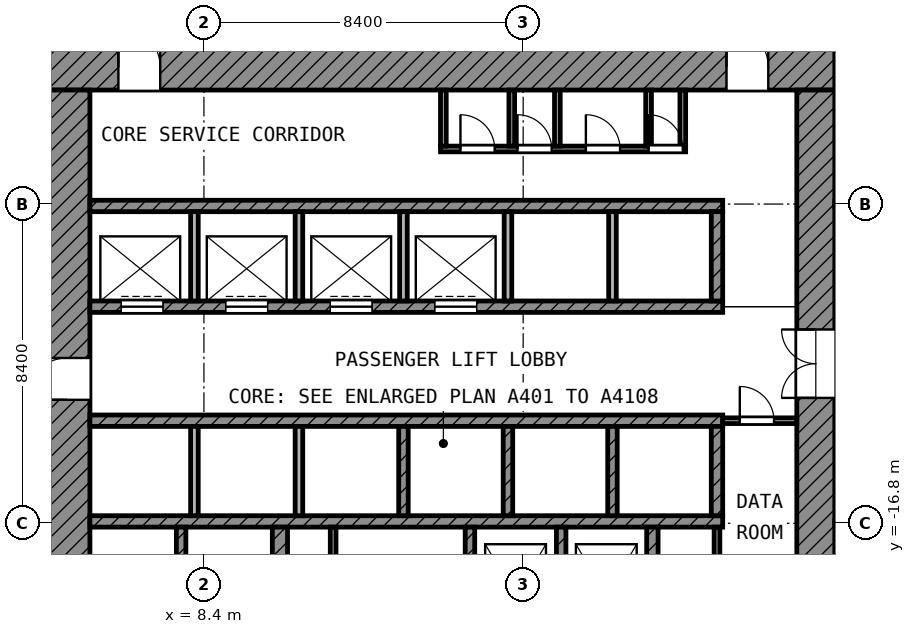
"""IFC4 building model, lengths in metres.
Left out: names, types, materials, properties, quantities, classifications, styles, units other than length and angle.
Written with IfcOpenShell. Run it as: python <this file> out.ifc"""

import sys

from ifc_helpers import new_model, si_unit, direction, frame, frame_2d, origin, place, context, subcontext, project, spatial, rectangle, extrude, element, fill, save


model = new_model("IFC4")
c1 = context("Model", 3, precision=1e-05, world=origin(), true_north=direction((0.0, 1.0)))
c2 = subcontext(c1, "Body", "Model", "MODEL_VIEW")
j1 = project(units=[si_unit("LENGTHUNIT", "METRE"), si_unit("PLANEANGLEUNIT", "RADIAN")], contexts=[c1])
p1 = place(None, origin())
s1 = spatial("IfcSite", under=j1, at=p1, CompositionType="ELEMENT")
p2 = place(p1, origin())
s2 = spatial("IfcBuilding", under=s1, at=p2, CompositionType="ELEMENT")
p3 = place(p2, frame((0.0, 0.0, 149.2)))
s3 = spatial("IfcBuildingStorey", under=s2, at=p3, CompositionType="ELEMENT", Elevation=149.2)
p4 = place(p3, frame((4.2, -4.8, 0.0), z_axis=(0.0, 0.0, 1.0), x_axis=(1.0, 0.0, 0.0)))
e1 = element("IfcWall", 1, at=p4, inside=s3, PredefinedType="SHEAR", context=c2, shape_type="SweptSolid", body=[
    extrude(rectangle(XDim=20.8, YDim=1.2, at=frame_2d((10.4, 0.0))), origin(), (0.0, 0.0, 1.0), 3.7),
])
p5 = place(p4, frame((1.95, 0.0, 0.0)))
e2 = element("IfcOpeningElement", 2, at=p5, cuts=e1, PredefinedType="OPENING", context=c2, shape_type="SweptSolid", body=[
    extrude(rectangle(XDim=1.1, YDim=2.1, at=frame_2d((0.55, 1.05))), frame((0.0, 0.61, 0.0), z_axis=(0.0, -1.0, 0.0), x_axis=(1.0, 0.0, 0.0)), (0.0, 0.0, 1.0), 1.22),
])
p6 = place(p4, frame((17.95, 0.0, 0.0)))
e3 = element("IfcOpeningElement", 3, at=p6, cuts=e1, PredefinedType="OPENING", context=c2, shape_type="SweptSolid", body=[
    extrude(rectangle(XDim=1.1, YDim=2.1, at=frame_2d((0.55, 1.05))), frame((0.0, 0.61, 0.0), z_axis=(0.0, -1.0, 0.0), x_axis=(1.0, 0.0, 0.0)), (0.0, 0.0, 1.0), 1.22),
])
p7 = place(p3, frame((4.8, -25.0, 0.0), z_axis=(0.0, 0.0, 1.0), x_axis=(0.0, 1.0, 0.0)))
e4 = element("IfcWall", 4, at=p7, inside=s3, PredefinedType="SHEAR", context=c2, shape_type="SweptSolid", body=[
    extrude(rectangle(XDim=19.6, YDim=1.2, at=frame_2d((9.8, 0.0))), origin(), (0.0, 0.0, 1.0), 3.7),
])
p8 = place(p7, frame((11.45, 0.0, 0.0)))
e5 = element("IfcOpeningElement", 5, at=p8, cuts=e4, PredefinedType="OPENING", context=c2, shape_type="SweptSolid", body=[
    extrude(rectangle(XDim=1.1, YDim=2.1, at=frame_2d((0.55, 1.05))), frame((0.0, 0.61, 0.0), z_axis=(0.0, -1.0, 0.0), x_axis=(1.0, 0.0, 0.0)), (0.0, 0.0, 1.0), 1.22),
])
p9 = place(p7, frame((2.15, 0.0, 0.0)))
e6 = element("IfcOpeningElement", 6, at=p9, cuts=e4, PredefinedType="OPENING", context=c2, shape_type="SweptSolid", body=[
    extrude(rectangle(XDim=1.1, YDim=2.1, at=frame_2d((0.55, 1.05))), frame((0.0, 0.61, 0.0), z_axis=(0.0, -1.0, 0.0), x_axis=(1.0, 0.0, 0.0)), (0.0, 0.0, 1.0), 1.22),
])
p10 = place(p3, frame((24.5, -24.0, 0.0), z_axis=(0.0, 0.0, 1.0), x_axis=(0.0, 1.0, 0.0)))
e7 = element("IfcWall", 7, at=p10, inside=s3, PredefinedType="SHEAR", context=c2, shape_type="SweptSolid", body=[
    extrude(rectangle(XDim=18.6, YDim=1.0, at=frame_2d((9.3, 0.0))), origin(), (0.0, 0.0, 1.0), 3.7),
])
p11 = place(p10, frame((10.5, 0.0, 0.0)))
e8 = element("IfcOpeningElement", 8, at=p11, cuts=e7, PredefinedType="OPENING", context=c2, shape_type="SweptSolid", body=[
    extrude(rectangle(XDim=1.8, YDim=2.1, at=frame_2d((0.9, 1.05))), frame((0.0, 0.51, 0.0), z_axis=(0.0, -1.0, 0.0), x_axis=(1.0, 0.0, 0.0)), (0.0, 0.0, 1.0), 1.02),
])
p12 = place(p3, frame((5.4, -8.45, 0.0), z_axis=(0.0, 0.0, 1.0), x_axis=(1.0, 0.0, 0.0)))
e9 = element("IfcWall", 9, at=p12, inside=s3, PredefinedType="SHEAR", context=c2, shape_type="SweptSolid", body=[
    extrude(rectangle(XDim=16.65, YDim=0.3, at=frame_2d((8.325, 0.0))), origin(), (0.0, 0.0, 1.0), 3.7),
])
p13 = place(p3, frame((5.4, -11.1, 0.0), z_axis=(0.0, 0.0, 1.0), x_axis=(1.0, 0.0, 0.0)))
e10 = element("IfcWall", 10, at=p13, inside=s3, PredefinedType="SHEAR", context=c2, shape_type="SweptSolid", body=[
    extrude(rectangle(XDim=16.65, YDim=0.3, at=frame_2d((8.325, 0.0))), origin(), (0.0, 0.0, 1.0), 3.7),
])
p14 = place(p13, frame((0.825, 0.0, 0.0)))
e11 = element("IfcOpeningElement", 11, at=p14, cuts=e10, PredefinedType="OPENING", context=c2, shape_type="SweptSolid", body=[
    extrude(rectangle(XDim=1.1, YDim=2.1, at=frame_2d((0.55, 1.05))), frame((0.0, 0.16, 0.0), z_axis=(0.0, -1.0, 0.0), x_axis=(1.0, 0.0, 0.0)), (0.0, 0.0, 1.0), 0.32),
])
p15 = place(p13, frame((3.575, 0.0, 0.0)))
e12 = element("IfcOpeningElement", 12, at=p15, cuts=e10, PredefinedType="OPENING", context=c2, shape_type="SweptSolid", body=[
    extrude(rectangle(XDim=1.1, YDim=2.1, at=frame_2d((0.55, 1.05))), frame((0.0, 0.16, 0.0), z_axis=(0.0, -1.0, 0.0), x_axis=(1.0, 0.0, 0.0)), (0.0, 0.0, 1.0), 0.32),
])
p16 = place(p13, frame((6.325, 0.0, 0.0)))
e13 = element("IfcOpeningElement", 13, at=p16, cuts=e10, PredefinedType="OPENING", context=c2, shape_type="SweptSolid", body=[
    extrude(rectangle(XDim=1.1, YDim=2.1, at=frame_2d((0.55, 1.05))), frame((0.0, 0.16, 0.0), z_axis=(0.0, -1.0, 0.0), x_axis=(1.0, 0.0, 0.0)), (0.0, 0.0, 1.0), 0.32),
])
p17 = place(p13, frame((9.075, 0.0, 0.0)))
e14 = element("IfcOpeningElement", 14, at=p17, cuts=e10, PredefinedType="OPENING", context=c2, shape_type="SweptSolid", body=[
    extrude(rectangle(XDim=1.1, YDim=2.1, at=frame_2d((0.55, 1.05))), frame((0.0, 0.16, 0.0), z_axis=(0.0, -1.0, 0.0), x_axis=(1.0, 0.0, 0.0)), (0.0, 0.0, 1.0), 0.32),
])
for number, where, z_axis, x_axis in (
    (15, (5.4, -14.1, 0.0), (0.0, 0.0, 1.0), (1.0, 0.0, 0.0)),
    (16, (5.4, -16.75, 0.0), (0.0, 0.0, 1.0), (1.0, 0.0, 0.0)),
):
    element("IfcWall", number, at=place(p3, frame(where, z_axis=z_axis, x_axis=x_axis)), inside=s3, PredefinedType="SHEAR", context=c2, shape_type="SweptSolid", body=[
        extrude(rectangle(XDim=16.65, YDim=0.3, at=frame_2d((8.325, 0.0))), origin(), (0.0, 0.0, 1.0), 3.7),
    ])
p18 = place(p3, frame((10.4, -20.05, 0.0), z_axis=(0.0, 0.0, 1.0), x_axis=(0.0, 1.0, 0.0)))
e17 = element("IfcWall", 17, at=p18, inside=s3, PredefinedType="SHEAR", context=c2, shape_type="SweptSolid", body=[
    extrude(rectangle(XDim=3.15, YDim=0.4, at=frame_2d((1.575, 0.0))), origin(), (0.0, 0.0, 1.0), 3.7),
])
p19 = place(p3, frame((20.2, -20.35, 0.0), z_axis=(0.0, 0.0, 1.0), x_axis=(0.0, 1.0, 0.0)))
e18 = element("IfcWall", 18, at=p19, inside=s3, PredefinedType="SHEAR", context=c2, shape_type="SweptSolid", body=[
    extrude(rectangle(XDim=3.45, YDim=0.3, at=frame_2d((1.725, 0.0))), origin(), (0.0, 0.0, 1.0), 3.7),
])
p20 = place(p3, frame((21.9, -10.95, 0.0), z_axis=(0.0, 0.0, 1.0), x_axis=(0.0, 1.0, 0.0)))
e19 = element("IfcWall", 19, at=p20, inside=s3, PredefinedType="SHEAR", context=c2, shape_type="SweptSolid", body=[
    extrude(rectangle(XDim=2.35, YDim=0.3, at=frame_2d((1.175, 0.0))), origin(), (0.0, 0.0, 1.0), 3.7),
])
p21 = place(p3, frame((21.9, -16.6, 0.0), z_axis=(0.0, 0.0, 1.0), x_axis=(0.0, 1.0, 0.0)))
e20 = element("IfcWall", 20, at=p21, inside=s3, PredefinedType="SHEAR", context=c2, shape_type="SweptSolid", body=[
    extrude(rectangle(XDim=2.35, YDim=0.3, at=frame_2d((1.175, 0.0))), origin(), (0.0, 0.0, 1.0), 3.7),
])
for number, where, z_axis, x_axis in (
    (21, (7.8, -20.05, 0.0), (0.0, 0.0, 1.0), (0.0, 1.0, 0.0)),
    (22, (15.4, -20.05, 0.0), (0.0, 0.0, 1.0), (0.0, 1.0, 0.0)),
    (23, (17.8, -20.05, 0.0), (0.0, 0.0, 1.0), (0.0, 1.0, 0.0)),
):
    element("IfcWall", number, at=place(p3, frame(where, z_axis=z_axis, x_axis=x_axis)), inside=s3, PredefinedType="SHEAR", context=c2, shape_type="SweptSolid", body=[
        extrude(rectangle(XDim=3.15, YDim=0.25, at=frame_2d((1.575, 0.0))), origin(), (0.0, 0.0, 1.0), 3.7),
    ])
for number, where, z_axis, x_axis in (
    (24, (8.15, -10.95, 0.0), (0.0, 0.0, 1.0), (0.0, 1.0, 0.0)),
    (25, (10.9, -10.95, 0.0), (0.0, 0.0, 1.0), (0.0, 1.0, 0.0)),
    (26, (13.65, -10.95, 0.0), (0.0, 0.0, 1.0), (0.0, 1.0, 0.0)),
    (27, (16.4, -10.95, 0.0), (0.0, 0.0, 1.0), (0.0, 1.0, 0.0)),
    (28, (19.15, -10.95, 0.0), (0.0, 0.0, 1.0), (0.0, 1.0, 0.0)),
):
    element("IfcWall", number, at=place(p3, frame(where, z_axis=z_axis, x_axis=x_axis)), inside=s3, PredefinedType="PARTITIONING", context=c2, shape_type="SweptSolid", body=[
        extrude(rectangle(XDim=2.35, YDim=0.2, at=frame_2d((1.175, 0.0))), origin(), (0.0, 0.0, 1.0), 3.7),
    ])
for number, where, z_axis, x_axis in (
    (29, (8.15, -16.6, 0.0), (0.0, 0.0, 1.0), (0.0, 1.0, 0.0)),
    (30, (10.9, -16.6, 0.0), (0.0, 0.0, 1.0), (0.0, 1.0, 0.0)),
):
    element("IfcWall", number, at=place(p3, frame(where, z_axis=z_axis, x_axis=x_axis)), inside=s3, PredefinedType="PARTITIONING", context=c2, shape_type="SweptSolid", body=[
        extrude(rectangle(XDim=2.35, YDim=0.2, at=frame_2d((1.175, 0.0))), origin(), (0.0, 0.0, 1.0), 3.7),
    ])
for number, where, z_axis, x_axis in (
    (31, (13.65, -16.6, 0.0), (0.0, 0.0, 1.0), (0.0, 1.0, 0.0)),
    (32, (16.4, -16.6, 0.0), (0.0, 0.0, 1.0), (0.0, 1.0, 0.0)),
    (33, (19.15, -16.6, 0.0), (0.0, 0.0, 1.0), (0.0, 1.0, 0.0)),
):
    element("IfcWall", number, at=place(p3, frame(where, z_axis=z_axis, x_axis=x_axis)), inside=s3, PredefinedType="SHEAR", context=c2, shape_type="SweptSolid", body=[
        extrude(rectangle(XDim=2.35, YDim=0.25, at=frame_2d((1.175, 0.0))), origin(), (0.0, 0.0, 1.0), 3.7),
    ])
p22 = place(p3, frame((21.9, -19.05, 0.0), z_axis=(0.0, 0.0, 1.0), x_axis=(0.0, 1.0, 0.0)))
e34 = element("IfcWall", 34, at=p22, inside=s3, PredefinedType="PARTITIONING", context=c2, shape_type="SweptSolid", body=[
    extrude(rectangle(XDim=2.15, YDim=0.15, at=frame_2d((1.075, 0.0))), origin(), (0.0, 0.0, 1.0), 3.7),
])
p23 = place(p3, frame((22.05, -14.1, 0.0), z_axis=(0.0, 0.0, 1.0), x_axis=(1.0, 0.0, 0.0)))
e35 = element("IfcWall", 35, at=p23, inside=s3, PredefinedType="PARTITIONING", context=c2, shape_type="SweptSolid", body=[
    extrude(rectangle(XDim=1.95, YDim=0.15, at=frame_2d((0.975, 0.0))), origin(), (0.0, 0.0, 1.0), 3.7),
])
p24 = place(p23, frame((0.45, 0.0, 0.0)))
e36 = element("IfcOpeningElement", 36, at=p24, cuts=e35, PredefinedType="OPENING", context=c2, shape_type="SweptSolid", body=[
    extrude(rectangle(XDim=0.9, YDim=2.1, at=frame_2d((0.45, 1.05))), frame((0.0, 0.085, 0.0), z_axis=(0.0, -1.0, 0.0), x_axis=(1.0, 0.0, 0.0)), (0.0, 0.0, 1.0), 0.17),
])
p25 = place(p3, frame((14.625, -6.95, 0.0), z_axis=(0.0, 0.0, 1.0), x_axis=(1.0, 0.0, 0.0)))
e37 = element("IfcWall", 37, at=p25, inside=s3, PredefinedType="PARTITIONING", context=c2, shape_type="SweptSolid", body=[
    extrude(rectangle(XDim=6.45, YDim=0.15, at=frame_2d((3.225, 0.0))), origin(), (0.0, 0.0, 1.0), 3.7),
])
p26 = place(p25, frame((0.525, 0.0, 0.0)))
e38 = element("IfcOpeningElement", 38, at=p26, cuts=e37, PredefinedType="OPENING", context=c2, shape_type="SweptSolid", body=[
    extrude(rectangle(XDim=0.9, YDim=2.1, at=frame_2d((0.45, 1.05))), frame((0.0, 0.085, 0.0), z_axis=(0.0, -1.0, 0.0), x_axis=(1.0, 0.0, 0.0)), (0.0, 0.0, 1.0), 0.17),
])
p27 = place(p25, frame((2.025, 0.0, 0.0)))
e39 = element("IfcOpeningElement", 39, at=p27, cuts=e37, PredefinedType="OPENING", context=c2, shape_type="SweptSolid", body=[
    extrude(rectangle(XDim=0.9, YDim=2.1, at=frame_2d((0.45, 1.05))), frame((0.0, 0.085, 0.0), z_axis=(0.0, -1.0, 0.0), x_axis=(1.0, 0.0, 0.0)), (0.0, 0.0, 1.0), 0.17),
])
p28 = place(p25, frame((3.825, 0.0, 0.0)))
e40 = element("IfcOpeningElement", 40, at=p28, cuts=e37, PredefinedType="OPENING", context=c2, shape_type="SweptSolid", body=[
    extrude(rectangle(XDim=0.9, YDim=2.1, at=frame_2d((0.45, 1.05))), frame((0.0, 0.085, 0.0), z_axis=(0.0, -1.0, 0.0), x_axis=(1.0, 0.0, 0.0)), (0.0, 0.0, 1.0), 0.17),
])
p29 = place(p25, frame((5.475, 0.0, 0.0)))
e41 = element("IfcOpeningElement", 41, at=p29, cuts=e37, PredefinedType="OPENING", context=c2, shape_type="SweptSolid", body=[
    extrude(rectangle(XDim=0.9, YDim=2.1, at=frame_2d((0.45, 1.05))), frame((0.0, 0.085, 0.0), z_axis=(0.0, -1.0, 0.0), x_axis=(1.0, 0.0, 0.0)), (0.0, 0.0, 1.0), 0.17),
])
p30 = place(p3, frame((11.8, -20.05, 0.0), z_axis=(0.0, 0.0, 1.0), x_axis=(0.0, 1.0, 0.0)))
e42 = element("IfcWall", 42, at=p30, inside=s3, PredefinedType="PARTITIONING", context=c2, shape_type="SweptSolid", body=[
    extrude(rectangle(XDim=3.15, YDim=0.15, at=frame_2d((1.575, 0.0))), origin(), (0.0, 0.0, 1.0), 3.7),
])
for number, where, z_axis, x_axis in (
    (43, (14.7, -6.875, 0.0), (0.0, 0.0, 1.0), (0.0, 1.0, 0.0)),
    (44, (16.5, -6.875, 0.0), (0.0, 0.0, 1.0), (0.0, 1.0, 0.0)),
    (45, (17.7, -6.875, 0.0), (0.0, 0.0, 1.0), (0.0, 1.0, 0.0)),
    (46, (20.1, -6.875, 0.0), (0.0, 0.0, 1.0), (0.0, 1.0, 0.0)),
    (47, (21.0, -6.875, 0.0), (0.0, 0.0, 1.0), (0.0, 1.0, 0.0)),
):
    element("IfcWall", number, at=place(p3, frame(where, z_axis=z_axis, x_axis=x_axis)), inside=s3, PredefinedType="PARTITIONING", context=c2, shape_type="SweptSolid", body=[
        extrude(rectangle(XDim=1.475, YDim=0.15, at=frame_2d((0.738, 0.0))), origin(), (0.0, 0.0, 1.0), 3.7),
    ])
p31 = place(p14, origin())
e48 = element("IfcDoor", 48, at=p31, inside=s3, OperationType="DOUBLE_DOOR_SLIDING", PredefinedType="DOOR", context=c2, shape_type="SweptSolid", body=[
    extrude(rectangle(XDim=1.1, YDim=2.1, at=frame_2d((0.55, 1.05))), frame((0.0, 0.025, 0.0), z_axis=(0.0, -1.0, 0.0), x_axis=(1.0, 0.0, 0.0)), (0.0, 0.0, 1.0), 0.05),
])
fill(e11, e48)
p32 = place(p15, origin())
e49 = element("IfcDoor", 49, at=p32, inside=s3, OperationType="DOUBLE_DOOR_SLIDING", PredefinedType="DOOR", context=c2, shape_type="SweptSolid", body=[
    extrude(rectangle(XDim=1.1, YDim=2.1, at=frame_2d((0.55, 1.05))), frame((0.0, 0.025, 0.0), z_axis=(0.0, -1.0, 0.0), x_axis=(1.0, 0.0, 0.0)), (0.0, 0.0, 1.0), 0.05),
])
fill(e12, e49)
p33 = place(p16, origin())
e50 = element("IfcDoor", 50, at=p33, inside=s3, OperationType="DOUBLE_DOOR_SLIDING", PredefinedType="DOOR", context=c2, shape_type="SweptSolid", body=[
    extrude(rectangle(XDim=1.1, YDim=2.1, at=frame_2d((0.55, 1.05))), frame((0.0, 0.025, 0.0), z_axis=(0.0, -1.0, 0.0), x_axis=(1.0, 0.0, 0.0)), (0.0, 0.0, 1.0), 0.05),
])
fill(e13, e50)
p34 = place(p17, origin())
e51 = element("IfcDoor", 51, at=p34, inside=s3, OperationType="DOUBLE_DOOR_SLIDING", PredefinedType="DOOR", context=c2, shape_type="SweptSolid", body=[
    extrude(rectangle(XDim=1.1, YDim=2.1, at=frame_2d((0.55, 1.05))), frame((0.0, 0.025, 0.0), z_axis=(0.0, -1.0, 0.0), x_axis=(1.0, 0.0, 0.0)), (0.0, 0.0, 1.0), 0.05),
])
fill(e14, e51)
p35 = place(p8, origin())
e52 = element("IfcDoor", 52, at=p35, inside=s3, OperationType="SINGLE_SWING_LEFT", PredefinedType="DOOR", context=c2, shape_type="SweptSolid", body=[
    extrude(rectangle(XDim=1.1, YDim=2.1, at=frame_2d((0.55, 1.05))), frame((0.0, 0.025, 0.0), z_axis=(0.0, -1.0, 0.0), x_axis=(1.0, 0.0, 0.0)), (0.0, 0.0, 1.0), 0.05),
])
fill(e5, e52)
p36 = place(p5, origin())
e53 = element("IfcDoor", 53, at=p36, inside=s3, OperationType="SINGLE_SWING_LEFT", PredefinedType="DOOR", context=c2, shape_type="SweptSolid", body=[
    extrude(rectangle(XDim=1.1, YDim=2.1, at=frame_2d((0.55, 1.05))), frame((0.0, 0.025, 0.0), z_axis=(0.0, -1.0, 0.0), x_axis=(1.0, 0.0, 0.0)), (0.0, 0.0, 1.0), 0.05),
])
fill(e2, e53)
p37 = place(p6, origin())
e54 = element("IfcDoor", 54, at=p37, inside=s3, OperationType="SINGLE_SWING_LEFT", PredefinedType="DOOR", context=c2, shape_type="SweptSolid", body=[
    extrude(rectangle(XDim=1.1, YDim=2.1, at=frame_2d((0.55, 1.05))), frame((0.0, 0.025, 0.0), z_axis=(0.0, -1.0, 0.0), x_axis=(1.0, 0.0, 0.0)), (0.0, 0.0, 1.0), 0.05),
])
fill(e3, e54)
p38 = place(p11, origin())
e55 = element("IfcDoor", 55, at=p38, inside=s3, OperationType="DOUBLE_DOOR_SINGLE_SWING", PredefinedType="DOOR", context=c2, shape_type="SweptSolid", body=[
    extrude(rectangle(XDim=1.8, YDim=2.1, at=frame_2d((0.9, 1.05))), frame((0.0, 0.025, 0.0), z_axis=(0.0, -1.0, 0.0), x_axis=(1.0, 0.0, 0.0)), (0.0, 0.0, 1.0), 0.05),
])
fill(e8, e55)
p39 = place(p26, origin())
e56 = element("IfcDoor", 56, at=p39, inside=s3, OperationType="SINGLE_SWING_LEFT", PredefinedType="DOOR", context=c2, shape_type="SweptSolid", body=[
    extrude(rectangle(XDim=0.9, YDim=2.1, at=frame_2d((0.45, 1.05))), frame((0.0, 0.025, 0.0), z_axis=(0.0, -1.0, 0.0), x_axis=(1.0, 0.0, 0.0)), (0.0, 0.0, 1.0), 0.05),
])
fill(e38, e56)
p40 = place(p27, origin())
e57 = element("IfcDoor", 57, at=p40, inside=s3, OperationType="SINGLE_SWING_LEFT", PredefinedType="DOOR", context=c2, shape_type="SweptSolid", body=[
    extrude(rectangle(XDim=0.9, YDim=2.1, at=frame_2d((0.45, 1.05))), frame((0.0, 0.025, 0.0), z_axis=(0.0, -1.0, 0.0), x_axis=(1.0, 0.0, 0.0)), (0.0, 0.0, 1.0), 0.05),
])
fill(e39, e57)
p41 = place(p28, origin())
e58 = element("IfcDoor", 58, at=p41, inside=s3, OperationType="SINGLE_SWING_LEFT", PredefinedType="DOOR", context=c2, shape_type="SweptSolid", body=[
    extrude(rectangle(XDim=0.9, YDim=2.1, at=frame_2d((0.45, 1.05))), frame((0.0, 0.025, 0.0), z_axis=(0.0, -1.0, 0.0), x_axis=(1.0, 0.0, 0.0)), (0.0, 0.0, 1.0), 0.05),
])
fill(e40, e58)
p42 = place(p29, origin())
e59 = element("IfcDoor", 59, at=p42, inside=s3, OperationType="SINGLE_SWING_LEFT", PredefinedType="DOOR", context=c2, shape_type="SweptSolid", body=[
    extrude(rectangle(XDim=0.9, YDim=2.1, at=frame_2d((0.45, 1.05))), frame((0.0, 0.025, 0.0), z_axis=(0.0, -1.0, 0.0), x_axis=(1.0, 0.0, 0.0)), (0.0, 0.0, 1.0), 0.05),
])
fill(e41, e59)
p43 = place(p24, origin())
e60 = element("IfcDoor", 60, at=p43, inside=s3, OperationType="SINGLE_SWING_LEFT", PredefinedType="DOOR", context=c2, shape_type="SweptSolid", body=[
    extrude(rectangle(XDim=0.9, YDim=2.1, at=frame_2d((0.45, 1.05))), frame((0.0, 0.025, 0.0), z_axis=(0.0, -1.0, 0.0), x_axis=(1.0, 0.0, 0.0)), (0.0, 0.0, 1.0), 0.05),
])
fill(e36, e60)
save(model, sys.argv[1])
